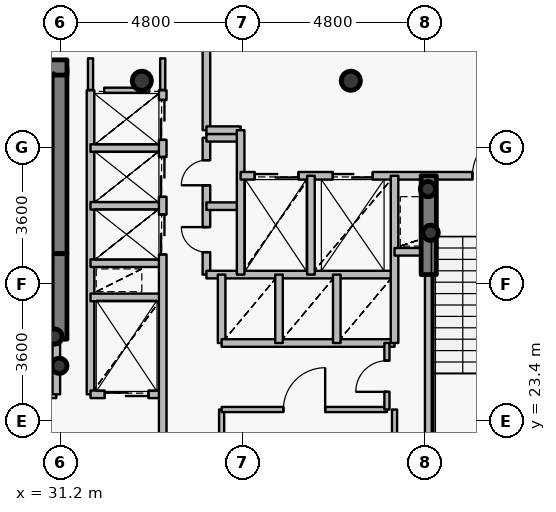
"""IFC4 building model, lengths in metres.
Left out: names, types, materials, properties, quantities, classifications, styles, units other than length and angle.
Written with IfcOpenShell. Run it as: python <this file> out.ifc"""

import sys

from ifc_helpers import new_model, si_unit, direction, frame, frame_2d, origin, origin_2d, place, context, subcontext, project, spatial, rectangle, hollow_circle, extrude, source, transform, mapped, element, fill, save


model = new_model("IFC4")
c1 = context("Model", 3, precision=1e-05, world=origin(), true_north=direction((0.0, 1.0)))
c2 = subcontext(c1, "Body", "Model", "MODEL_VIEW")
j1 = project(units=[si_unit("LENGTHUNIT", "METRE"), si_unit("PLANEANGLEUNIT", "RADIAN")], contexts=[c1])
p1 = place(None, origin())
s1 = spatial("IfcSite", under=j1, at=p1, CompositionType="ELEMENT")
p2 = place(p1, origin())
s2 = spatial("IfcBuilding", under=s1, at=p2, CompositionType="ELEMENT")
p3 = place(p2, frame((0.0, 0.0, 189.9)))
s3 = spatial("IfcBuildingStorey", under=s2, at=p3, CompositionType="ELEMENT", Elevation=189.9)
for number, where, z_axis, x_axis in (
    (1, (38.85, 32.35, 0.0), (0.0, 0.0, 1.0), (1.0, 0.0, 0.0)),
    (2, (33.35, 32.35, 0.0), (0.0, 0.0, 1.0), (1.0, 0.0, 0.0)),
):
    element("IfcColumn", number, at=place(p3, frame(where, z_axis=z_axis, x_axis=x_axis)), inside=s3, PredefinedType="COLUMN", context=c2, shape_type="SweptSolid", body=[
        extrude(hollow_circle(Radius=0.254, WallThickness=0.02, at=origin_2d()), origin(), (0.0, 0.0, 1.0), 3.75),
    ])
p4 = place(p3, frame((31.18, 27.8, 0.0), z_axis=(0.0, 0.0, 1.0), x_axis=(0.0, 1.0, 0.0)))
e3 = element("IfcWall", 3, at=p4, inside=s3, PredefinedType="SHEAR", context=c2, shape_type="SweptSolid", body=[
    extrude(rectangle(XDim=4.9, YDim=0.4, at=frame_2d((2.45, 0.0))), origin(), (0.0, 0.0, 1.0), 3.75),
])
p5 = place(p3, frame((27.28, 32.7, 0.0), z_axis=(0.0, 0.0, 1.0), x_axis=(1.0, 0.0, 0.0)))
e4 = element("IfcWall", 4, at=p5, inside=s3, PredefinedType="SHEAR", context=c2, shape_type="SweptSolid", body=[
    extrude(rectangle(XDim=4.1, YDim=0.4, at=frame_2d((2.05, 0.0))), origin(), (0.0, 0.0, 1.0), 3.75),
])
for number, where, z_axis, x_axis in (
    (5, (31.05, 25.62, 0.0), (0.0, 0.0, 1.0), (1.0, 0.0, 0.0)),
    (6, (31.18, 24.85, 0.0), (0.0, 0.0, 1.0), (1.0, 0.0, 0.0)),
    (7, (40.95, 28.35, 0.0), (0.0, 0.0, 1.0), (1.0, 0.0, 0.0)),
    (8, (40.88, 29.5, 0.0), (0.0, 0.0, 1.0), (1.0, 0.0, 0.0)),
):
    element("IfcColumn", number, at=place(p3, frame(where, z_axis=z_axis, x_axis=x_axis)), inside=s3, PredefinedType="COLUMN", context=c2, shape_type="SweptSolid", body=[
        extrude(hollow_circle(Radius=0.203, WallThickness=0.016, at=origin_2d()), origin(), (0.0, 0.0, 1.0), 3.75),
    ])
p6 = place(p3, frame((31.18, 25.55, 0.0), z_axis=(0.0, 0.0, 1.0), x_axis=(0.0, 1.0, 0.0)))
e9 = element("IfcWall", 9, at=p6, inside=s3, PredefinedType="SHEAR", context=c2, shape_type="SweptSolid", body=[
    extrude(rectangle(XDim=2.25, YDim=0.4, at=frame_2d((1.125, 0.0))), origin(), (0.0, 0.0, 1.0), 3.1),
])
p7 = place(p3, frame((40.9, 27.25, 0.0), z_axis=(0.0, 0.0, 1.0), x_axis=(0.0, 1.0, 0.0)))
e10 = element("IfcWall", 10, at=p7, inside=s3, PredefinedType="SHEAR", context=c2, shape_type="SweptSolid", body=[
    extrude(rectangle(XDim=2.6, YDim=0.4, at=frame_2d((1.3, 0.0))), origin(), (0.0, 0.0, 1.0), 3.1),
])
p8 = place(p3, frame((27.56, 24.1, 0.0), z_axis=(0.0, 0.0, 1.0), x_axis=(1.0, 0.0, 0.0)))
e11 = element("IfcWall", 11, at=p8, inside=s3, PredefinedType="PARTITIONING", context=c2, shape_type="SweptSolid", body=[
    extrude(rectangle(XDim=3.54, YDim=0.2, at=frame_2d((1.77, 0.0))), origin(), (0.0, 0.0, 1.0), 3.5),
])
p9 = place(p8, frame((1.17, 0.0, 0.0)))
e12 = element("IfcOpeningElement", 12, at=p9, cuts=e11, PredefinedType="OPENING", context=c2, shape_type="SweptSolid", body=[
    extrude(rectangle(XDim=1.2, YDim=2.15, at=origin_2d()), frame((0.6, 0.11, 1.075), z_axis=(0.0, -1.0, 0.0), x_axis=(1.0, 0.0, 0.0)), (0.0, 0.0, 1.0), 0.22),
])
p10 = place(p3, frame((31.1, 24.1, 0.0), z_axis=(0.0, 0.0, 1.0), x_axis=(0.0, 1.0, 0.0)))
e13 = element("IfcWall", 13, at=p10, inside=s3, PredefinedType="PARTITIONING", context=c2, shape_type="SweptSolid", body=[
    extrude(rectangle(XDim=1.44, YDim=0.2, at=frame_2d((0.72, 0.0))), origin(), (0.0, 0.0, 1.0), 3.5),
])
p11 = place(p3, frame((32.0, 24.1, 0.0), z_axis=(0.0, 0.0, 1.0), x_axis=(0.0, 1.0, 0.0)))
e14 = element("IfcWall", 14, at=p11, inside=s3, PredefinedType="PARTITIONING", context=c2, shape_type="SweptSolid", body=[
    extrude(rectangle(XDim=8.0, YDim=0.2, at=frame_2d((4.0, 0.0))), origin(), (0.0, 0.0, 1.0), 3.5),
])
p12 = place(p3, frame((32.0, 24.1, 0.0), z_axis=(0.0, 0.0, 1.0), x_axis=(1.0, 0.0, 0.0)))
e15 = element("IfcWall", 15, at=p12, inside=s3, PredefinedType="PARTITIONING", context=c2, shape_type="SweptSolid", body=[
    extrude(rectangle(XDim=1.9, YDim=0.2, at=frame_2d((0.95, 0.0))), origin(), (0.0, 0.0, 1.0), 3.085),
])
p13 = place(p12, frame((0.375, 0.0, 0.0)))
e16 = element("IfcOpeningElement", 16, at=p13, cuts=e15, PredefinedType="OPENING", context=c2, shape_type="SweptSolid", body=[
    extrude(rectangle(XDim=1.15, YDim=2.15, at=origin_2d()), frame((0.575, 0.11, 1.075), z_axis=(0.0, -1.0, 0.0), x_axis=(1.0, 0.0, 0.0)), (0.0, 0.0, 1.0), 0.22),
])
for number, where, z_axis, x_axis in (
    (17, (32.0, 26.65, 0.0), (0.0, 0.0, 1.0), (1.0, 0.0, 0.0)),
    (18, (32.0, 27.55, 0.0), (0.0, 0.0, 1.0), (1.0, 0.0, 0.0)),
    (19, (32.0, 29.06, 0.0), (0.0, 0.0, 1.0), (1.0, 0.0, 0.0)),
    (20, (32.0, 30.58, 0.0), (0.0, 0.0, 1.0), (1.0, 0.0, 0.0)),
):
    element("IfcWall", number, at=place(p3, frame(where, z_axis=z_axis, x_axis=x_axis)), inside=s3, PredefinedType="PARTITIONING", context=c2, shape_type="SweptSolid", body=[
        extrude(rectangle(XDim=1.9, YDim=0.2, at=frame_2d((0.95, 0.0))), origin(), (0.0, 0.0, 1.0), 3.085),
    ])
p14 = place(p3, frame((33.9, 20.8, 0.0), z_axis=(0.0, 0.0, 1.0), x_axis=(0.0, 1.0, 0.0)))
e21 = element("IfcWall", 21, at=p14, inside=s3, PredefinedType="PARTITIONING", context=c2, shape_type="SweptSolid", body=[
    extrude(rectangle(XDim=11.3, YDim=0.2, at=frame_2d((5.65, 0.0))), origin(), (0.0, 0.0, 1.0), 3.085),
])
p15 = place(p14, frame((6.98, 0.0, 0.0)))
e22 = element("IfcOpeningElement", 22, at=p15, cuts=e21, PredefinedType="OPENING", context=c2, shape_type="SweptSolid", body=[
    extrude(rectangle(XDim=1.05, YDim=2.15, at=origin_2d()), frame((0.525, 0.11, 1.075), z_axis=(0.0, -1.0, 0.0), x_axis=(1.0, 0.0, 0.0)), (0.0, 0.0, 1.0), 0.22),
])
p16 = place(p14, frame((8.495, 0.0, 0.0)))
e23 = element("IfcOpeningElement", 23, at=p16, cuts=e21, PredefinedType="OPENING", context=c2, shape_type="SweptSolid", body=[
    extrude(rectangle(XDim=1.05, YDim=2.15, at=origin_2d()), frame((0.525, 0.11, 1.075), z_axis=(0.0, -1.0, 0.0), x_axis=(1.0, 0.0, 0.0)), (0.0, 0.0, 1.0), 0.22),
])
p17 = place(p14, frame((9.995, 0.0, 0.0)))
e24 = element("IfcOpeningElement", 24, at=p17, cuts=e21, PredefinedType="OPENING", context=c2, shape_type="SweptSolid", body=[
    extrude(rectangle(XDim=1.05, YDim=2.15, at=origin_2d()), frame((0.525, 0.11, 1.075), z_axis=(0.0, -1.0, 0.0), x_axis=(1.0, 0.0, 0.0)), (0.0, 0.0, 1.0), 0.22),
])
p18 = place(p3, frame((35.05, 27.25, 0.0), z_axis=(0.0, 0.0, 1.0), x_axis=(0.0, 1.0, 0.0)))
e25 = element("IfcWall", 25, at=p18, inside=s3, PredefinedType="PARTITIONING", context=c2, shape_type="SweptSolid", body=[
    extrude(rectangle(XDim=3.6, YDim=0.2, at=frame_2d((1.8, 0.0))), origin(), (0.0, 0.0, 1.0), 3.5),
])
p19 = place(p18, frame((0.59, 0.0, 0.0)))
e26 = element("IfcOpeningElement", 26, at=p19, cuts=e25, PredefinedType="OPENING", context=c2, shape_type="SweptSolid", body=[
    extrude(rectangle(XDim=0.66, YDim=2.05, at=origin_2d()), frame((0.33, 0.11, 1.025), z_axis=(0.0, -1.0, 0.0), x_axis=(1.0, 0.0, 0.0)), (0.0, 0.0, 1.0), 0.22),
])
p20 = place(p18, frame((2.35, 0.0, 0.0)))
e27 = element("IfcOpeningElement", 27, at=p20, cuts=e25, PredefinedType="OPENING", context=c2, shape_type="SweptSolid", body=[
    extrude(rectangle(XDim=0.66, YDim=2.05, at=origin_2d()), frame((0.33, 0.11, 1.025), z_axis=(0.0, -1.0, 0.0), x_axis=(1.0, 0.0, 0.0)), (0.0, 0.0, 1.0), 0.22),
])
p21 = place(p3, frame((35.05, 27.25, 0.0), z_axis=(0.0, 0.0, 1.0), x_axis=(1.0, 0.0, 0.0)))
e28 = element("IfcWall", 28, at=p21, inside=s3, PredefinedType="PARTITIONING", context=c2, shape_type="SweptSolid", body=[
    extrude(rectangle(XDim=4.95, YDim=0.2, at=frame_2d((2.475, 0.0))), origin(), (0.0, 0.0, 1.0), 3.085),
])
for number, where, z_axis, x_axis in (
    (29, (35.05, 29.05, 0.0), (0.0, 0.0, 1.0), (1.0, 0.0, 0.0)),
    (30, (35.05, 30.85, 0.0), (0.0, 0.0, 1.0), (1.0, 0.0, 0.0)),
):
    element("IfcWall", number, at=place(p3, frame(where, z_axis=z_axis, x_axis=x_axis)), inside=s3, PredefinedType="PARTITIONING", context=c2, shape_type="SweptSolid", body=[
        extrude(rectangle(XDim=0.9, YDim=0.2, at=frame_2d((0.45, 0.0))), origin(), (0.0, 0.0, 1.0), 3.5),
    ])
p22 = place(p3, frame((35.05, 31.05, 0.0), z_axis=(0.0, 0.0, 1.0), x_axis=(0.0, 1.0, 0.0)))
e31 = element("IfcWall", 31, at=p22, inside=s3, PredefinedType="PARTITIONING", context=c2, shape_type="SweptSolid", body=[
    extrude(rectangle(XDim=2.15, YDim=0.2, at=frame_2d((1.075, 0.0))), origin(), (0.0, 0.0, 1.0), 3.085),
])
p23 = place(p3, frame((35.05, 31.05, 0.0), z_axis=(0.0, 0.0, 1.0), x_axis=(1.0, 0.0, 0.0)))
e32 = element("IfcWall", 32, at=p23, inside=s3, PredefinedType="PARTITIONING", context=c2, shape_type="SweptSolid", body=[
    extrude(rectangle(XDim=0.9, YDim=0.2, at=frame_2d((0.45, 0.0))), origin(), (0.0, 0.0, 1.0), 3.5),
])
p24 = place(p3, frame((35.45, 20.8, 0.0), z_axis=(0.0, 0.0, 1.0), x_axis=(0.0, 1.0, 0.0)))
e33 = element("IfcWall", 33, at=p24, inside=s3, PredefinedType="PARTITIONING", context=c2, shape_type="SweptSolid", body=[
    extrude(rectangle(XDim=2.9, YDim=0.135, at=frame_2d((1.45, 0.0))), origin(), (0.0, 0.0, 1.0), 3.085),
])
p25 = place(p3, frame((35.45, 23.7, 0.0), z_axis=(0.0, 0.0, 1.0), x_axis=(1.0, 0.0, 0.0)))
e34 = element("IfcWall", 34, at=p25, inside=s3, PredefinedType="PARTITIONING", context=c2, shape_type="SweptSolid", body=[
    extrude(rectangle(XDim=4.35, YDim=0.135, at=frame_2d((2.175, 0.0))), origin(), (0.0, 0.0, 1.0), 3.085),
])
p26 = place(p25, frame((1.625, 0.0, 0.0)))
e35 = element("IfcOpeningElement", 35, at=p26, cuts=e34, PredefinedType="OPENING", context=c2, shape_type="SweptSolid", body=[
    extrude(rectangle(XDim=1.1, YDim=2.15, at=origin_2d()), frame((0.55, 0.078, 1.075), z_axis=(0.0, -1.0, 0.0), x_axis=(1.0, 0.0, 0.0)), (0.0, 0.0, 1.0), 0.155),
])
p27 = place(p3, frame((35.45, 25.45, 0.0), z_axis=(0.0, 0.0, 1.0), x_axis=(0.0, 1.0, 0.0)))
e36 = element("IfcWall", 36, at=p27, inside=s3, PredefinedType="PARTITIONING", context=c2, shape_type="SweptSolid", body=[
    extrude(rectangle(XDim=1.8, YDim=0.2, at=frame_2d((0.9, 0.0))), origin(), (0.0, 0.0, 1.0), 3.5),
])
p28 = place(p3, frame((35.45, 25.45, 0.0), z_axis=(0.0, 0.0, 1.0), x_axis=(1.0, 0.0, 0.0)))
e37 = element("IfcWall", 37, at=p28, inside=s3, PredefinedType="PARTITIONING", context=c2, shape_type="SweptSolid", body=[
    extrude(rectangle(XDim=4.55, YDim=0.2, at=frame_2d((2.275, 0.0))), origin(), (0.0, 0.0, 1.0), 3.085),
])
p29 = place(p3, frame((35.95, 27.25, 0.0), z_axis=(0.0, 0.0, 1.0), x_axis=(0.0, 1.0, 0.0)))
e38 = element("IfcWall", 38, at=p29, inside=s3, PredefinedType="PARTITIONING", context=c2, shape_type="SweptSolid", body=[
    extrude(rectangle(XDim=3.8, YDim=0.2, at=frame_2d((1.9, 0.0))), origin(), (0.0, 0.0, 1.0), 3.5),
])
p30 = place(p3, frame((35.95, 29.85, 0.0), z_axis=(0.0, 0.0, 1.0), x_axis=(1.0, 0.0, 0.0)))
e39 = element("IfcWall", 39, at=p30, inside=s3, PredefinedType="PARTITIONING", context=c2, shape_type="SweptSolid", body=[
    extrude(rectangle(XDim=8.49, YDim=0.2, at=frame_2d((4.245, 0.0))), origin(), (0.0, 0.0, 1.0), 3.085),
])
p31 = place(p30, frame((6.1, 0.0, 0.0)))
e40 = element("IfcOpeningElement", 40, at=p31, cuts=e39, PredefinedType="OPENING", context=c2, shape_type="SweptSolid", body=[
    extrude(rectangle(XDim=1.2, YDim=2.15, at=origin_2d()), frame((0.6, 0.11, 1.075), z_axis=(0.0, -1.0, 0.0), x_axis=(1.0, 0.0, 0.0)), (0.0, 0.0, 1.0), 0.22),
])
p32 = place(p30, frame((0.37, 0.0, 0.0)))
e41 = element("IfcOpeningElement", 41, at=p32, cuts=e39, PredefinedType="OPENING", context=c2, shape_type="SweptSolid", body=[
    extrude(rectangle(XDim=1.15, YDim=2.15, at=origin_2d()), frame((0.575, 0.11, 1.075), z_axis=(0.0, -1.0, 0.0), x_axis=(1.0, 0.0, 0.0)), (0.0, 0.0, 1.0), 0.22),
])
p33 = place(p30, frame((2.425, 0.0, 0.0)))
e42 = element("IfcOpeningElement", 42, at=p33, cuts=e39, PredefinedType="OPENING", context=c2, shape_type="SweptSolid", body=[
    extrude(rectangle(XDim=1.05, YDim=2.15, at=origin_2d()), frame((0.525, 0.11, 1.075), z_axis=(0.0, -1.0, 0.0), x_axis=(1.0, 0.0, 0.0)), (0.0, 0.0, 1.0), 0.22),
])
p34 = place(p3, frame((36.96, 25.45, 0.0), z_axis=(0.0, 0.0, 1.0), x_axis=(0.0, 1.0, 0.0)))
e43 = element("IfcWall", 43, at=p34, inside=s3, PredefinedType="PARTITIONING", context=c2, shape_type="SweptSolid", body=[
    extrude(rectangle(XDim=1.8, YDim=0.2, at=frame_2d((0.9, 0.0))), origin(), (0.0, 0.0, 1.0), 3.5),
])
p35 = place(p3, frame((37.8, 27.25, 0.0), z_axis=(0.0, 0.0, 1.0), x_axis=(0.0, 1.0, 0.0)))
e44 = element("IfcWall", 44, at=p35, inside=s3, PredefinedType="PARTITIONING", context=c2, shape_type="SweptSolid", body=[
    extrude(rectangle(XDim=2.6, YDim=0.2, at=frame_2d((1.3, 0.0))), origin(), (0.0, 0.0, 1.0), 3.5),
])
p36 = place(p3, frame((38.48, 25.45, 0.0), z_axis=(0.0, 0.0, 1.0), x_axis=(0.0, 1.0, 0.0)))
e45 = element("IfcWall", 45, at=p36, inside=s3, PredefinedType="PARTITIONING", context=c2, shape_type="SweptSolid", body=[
    extrude(rectangle(XDim=1.8, YDim=0.2, at=frame_2d((0.9, 0.0))), origin(), (0.0, 0.0, 1.0), 3.5),
])
p37 = place(p3, frame((39.8, 23.7, 0.0), z_axis=(0.0, 0.0, 1.0), x_axis=(0.0, 1.0, 0.0)))
e46 = element("IfcWall", 46, at=p37, inside=s3, PredefinedType="PARTITIONING", context=c2, shape_type="SweptSolid", body=[
    extrude(rectangle(XDim=1.75, YDim=0.135, at=frame_2d((0.875, 0.0))), origin(), (0.0, 0.0, 1.0), 3.5),
])
p38 = place(p37, frame((0.465, 0.0, 0.0)))
e47 = element("IfcOpeningElement", 47, at=p38, cuts=e46, PredefinedType="OPENING", context=c2, shape_type="SweptSolid", body=[
    extrude(rectangle(XDim=0.82, YDim=2.1, at=origin_2d()), frame((0.41, 0.078, 1.05), z_axis=(0.0, -1.0, 0.0), x_axis=(1.0, 0.0, 0.0)), (0.0, 0.0, 1.0), 0.155),
])
p39 = place(p3, frame((40.0, 25.45, 0.0), z_axis=(0.0, 0.0, 1.0), x_axis=(0.0, 1.0, 0.0)))
e48 = element("IfcWall", 48, at=p39, inside=s3, PredefinedType="PARTITIONING", context=c2, shape_type="SweptSolid", body=[
    extrude(rectangle(XDim=4.4, YDim=0.2, at=frame_2d((2.2, 0.0))), origin(), (0.0, 0.0, 1.0), 3.5),
])
p40 = place(p3, frame((40.0, 27.85, 0.0), z_axis=(0.0, 0.0, 1.0), x_axis=(1.0, 0.0, 0.0)))
e49 = element("IfcWall", 49, at=p40, inside=s3, PredefinedType="PARTITIONING", context=c2, shape_type="SweptSolid", body=[
    extrude(rectangle(XDim=0.9, YDim=0.2, at=frame_2d((0.45, 0.0))), origin(), (0.0, 0.0, 1.0), 3.5),
])
p41 = place(p3, frame((40.9, 21.33, 0.0), z_axis=(0.0, 0.0, 1.0), x_axis=(0.0, 1.0, 0.0)))
e50 = element("IfcWall", 50, at=p41, inside=s3, PredefinedType="PARTITIONING", context=c2, shape_type="SweptSolid", body=[
    extrude(rectangle(XDim=5.91, YDim=0.2, at=frame_2d((2.955, 0.0))), origin(), (0.0, 0.0, 1.0), 3.035),
])
p42 = place(p3, frame((32.36, 32.1, 0.0), z_axis=(0.0, 0.0, 1.0), x_axis=(1.0, 0.0, 0.0)))
e51 = element("IfcWall", 51, at=p42, inside=s3, PredefinedType="PARTITIONING", context=c2, shape_type="SweptSolid", body=[
    extrude(rectangle(XDim=1.18, YDim=0.135, at=frame_2d((0.59, 0.0))), origin(), (0.0, 0.0, 1.0), 3.085),
])
p43 = place(p3, frame((40.0, 23.7, 0.0), z_axis=(0.0, 0.0, 1.0), x_axis=(0.0, -1.0, 0.0)))
e52 = element("IfcWall", 52, at=p43, inside=s3, PredefinedType="PARTITIONING", context=c2, shape_type="SweptSolid", body=[
    extrude(rectangle(XDim=2.64, YDim=0.135, at=frame_2d((1.32, 0.0))), origin(), (0.0, 0.0, 1.0), 3.035),
])
p44 = place(p3, frame((32.0, 32.94, 0.0), z_axis=(0.0, 0.0, 1.0), x_axis=(0.0, -1.0, 0.0)))
e53 = element("IfcWall", 53, at=p44, inside=s3, PredefinedType="PARTITIONING", context=c2, shape_type="SweptSolid", body=[
    extrude(rectangle(XDim=0.83, YDim=0.135, at=frame_2d((0.415, 0.0))), origin(), (0.0, 0.0, 1.0), 3.035),
])
p45 = place(p3, frame((33.9, 32.11, 0.0), z_axis=(0.0, 0.0, 1.0), x_axis=(0.0, 1.0, 0.0)))
e54 = element("IfcWall", 54, at=p45, inside=s3, PredefinedType="PARTITIONING", context=c2, shape_type="SweptSolid", body=[
    extrude(rectangle(XDim=0.83, YDim=0.135, at=frame_2d((0.415, 0.0))), origin(), (0.0, 0.0, 1.0), 3.085),
])
m1 = source(origin(), c2, "Body", "SweptSolid", [
    extrude(rectangle(XDim=1.2, YDim=2.15, at=origin_2d()), frame((0.6, 0.025, 1.075), z_axis=(0.0, -1.0, 0.0), x_axis=(1.0, 0.0, 0.0)), (0.0, 0.0, 1.0), 0.05),
])
p46 = place(p31, origin())
e55 = element("IfcDoor", 55, at=p46, inside=s3, OperationType="SINGLE_SWING_RIGHT", PredefinedType="DOOR", context=c2, shape_type="MappedRepresentation", body=[
    mapped(m1, transform((0.0, 0.0, 0.0), x_axis=(1.0, 0.0, 0.0), y_axis=(0.0, 1.0, 0.0), z_axis=(0.0, 0.0, 1.0), scale=1.0)),
])
fill(e40, e55)
m2 = source(origin(), c2, "Body", "SweptSolid", [
    extrude(rectangle(XDim=1.15, YDim=2.15, at=origin_2d()), frame((0.575, 0.025, 1.075), z_axis=(0.0, -1.0, 0.0), x_axis=(1.0, 0.0, 0.0)), (0.0, 0.0, 1.0), 0.05),
])
p47 = place(p32, origin())
e56 = element("IfcDoor", 56, at=p47, inside=s3, OperationType="DOUBLE_DOOR_SLIDING", PredefinedType="USERDEFINED", context=c2, shape_type="MappedRepresentation", body=[
    mapped(m2, transform((0.0, 0.0, 0.0), x_axis=(1.0, 0.0, 0.0), y_axis=(0.0, 1.0, 0.0), z_axis=(0.0, 0.0, 1.0), scale=1.0)),
])
fill(e41, e56)
p48 = place(p13, origin())
e57 = element("IfcDoor", 57, at=p48, inside=s3, OperationType="DOUBLE_DOOR_SLIDING", PredefinedType="USERDEFINED", context=c2, shape_type="MappedRepresentation", body=[
    mapped(m2, transform((0.0, 0.0, 0.0), x_axis=(1.0, 0.0, 0.0), y_axis=(0.0, 1.0, 0.0), z_axis=(0.0, 0.0, 1.0), scale=1.0)),
])
fill(e16, e57)
m3 = source(origin(), c2, "Body", "SweptSolid", [
    extrude(rectangle(XDim=1.05, YDim=2.15, at=origin_2d()), frame((0.525, 0.025, 1.075), z_axis=(0.0, -1.0, 0.0), x_axis=(1.0, 0.0, 0.0)), (0.0, 0.0, 1.0), 0.05),
])
p49 = place(p33, origin())
e58 = element("IfcDoor", 58, at=p49, inside=s3, OperationType="DOUBLE_DOOR_SLIDING", PredefinedType="USERDEFINED", context=c2, shape_type="MappedRepresentation", body=[
    mapped(m3, transform((0.0, 0.0, 0.0), x_axis=(1.0, 0.0, 0.0), y_axis=(0.0, 1.0, 0.0), z_axis=(0.0, 0.0, 1.0), scale=1.0)),
])
fill(e42, e58)
p50 = place(p15, origin())
e59 = element("IfcDoor", 59, at=p50, inside=s3, OperationType="DOUBLE_DOOR_SLIDING", PredefinedType="USERDEFINED", context=c2, shape_type="MappedRepresentation", body=[
    mapped(m3, transform((0.0, 0.0, 0.0), x_axis=(1.0, 0.0, 0.0), y_axis=(0.0, 1.0, 0.0), z_axis=(0.0, 0.0, 1.0), scale=1.0)),
])
fill(e22, e59)
p51 = place(p16, origin())
e60 = element("IfcDoor", 60, at=p51, inside=s3, OperationType="DOUBLE_DOOR_SLIDING", PredefinedType="USERDEFINED", context=c2, shape_type="MappedRepresentation", body=[
    mapped(m3, transform((0.0, 0.0, 0.0), x_axis=(1.0, 0.0, 0.0), y_axis=(0.0, 1.0, 0.0), z_axis=(0.0, 0.0, 1.0), scale=1.0)),
])
fill(e23, e60)
p52 = place(p17, origin())
e61 = element("IfcDoor", 61, at=p52, inside=s3, OperationType="DOUBLE_DOOR_SLIDING", PredefinedType="USERDEFINED", context=c2, shape_type="MappedRepresentation", body=[
    mapped(m3, transform((0.0, 0.0, 0.0), x_axis=(1.0, 0.0, 0.0), y_axis=(0.0, 1.0, 0.0), z_axis=(0.0, 0.0, 1.0), scale=1.0)),
])
fill(e24, e61)
m4 = source(origin(), c2, "Body", "SweptSolid", [
    extrude(rectangle(XDim=0.66, YDim=2.05, at=origin_2d()), frame((0.33, 0.025, 1.025), z_axis=(0.0, -1.0, 0.0), x_axis=(1.0, 0.0, 0.0)), (0.0, 0.0, 1.0), 0.05),
])
p53 = place(p19, origin())
e62 = element("IfcDoor", 62, at=p53, inside=s3, OperationType="SINGLE_SWING_RIGHT", PredefinedType="USERDEFINED", context=c2, shape_type="MappedRepresentation", body=[
    mapped(m4, transform((0.0, 0.0, 0.0), x_axis=(1.0, 0.0, 0.0), y_axis=(0.0, 1.0, 0.0), z_axis=(0.0, 0.0, 1.0), scale=1.0)),
])
fill(e26, e62)
p54 = place(p20, origin())
e63 = element("IfcDoor", 63, at=p54, inside=s3, OperationType="SINGLE_SWING_LEFT", PredefinedType="USERDEFINED", context=c2, shape_type="MappedRepresentation", body=[
    mapped(m4, transform((0.0, 0.0, 0.0), x_axis=(1.0, 0.0, 0.0), y_axis=(0.0, 1.0, 0.0), z_axis=(0.0, 0.0, 1.0), scale=1.0)),
])
fill(e27, e63)
m5 = source(origin(), c2, "Body", "SweptSolid", [
    extrude(rectangle(XDim=1.1, YDim=2.15, at=origin_2d()), frame((0.55, 0.025, 1.075), z_axis=(0.0, -1.0, 0.0), x_axis=(1.0, 0.0, 0.0)), (0.0, 0.0, 1.0), 0.05),
])
p55 = place(p26, origin())
e64 = element("IfcDoor", 64, at=p55, inside=s3, OperationType="SINGLE_SWING_RIGHT", PredefinedType="DOOR", context=c2, shape_type="MappedRepresentation", body=[
    mapped(m5, transform((0.0, 0.0, 0.0), x_axis=(1.0, 0.0, 0.0), y_axis=(0.0, 1.0, 0.0), z_axis=(0.0, 0.0, 1.0), scale=1.0)),
])
fill(e35, e64)
m6 = source(origin(), c2, "Body", "SweptSolid", [
    extrude(rectangle(XDim=0.82, YDim=2.1, at=origin_2d()), frame((0.41, 0.025, 1.05), z_axis=(0.0, -1.0, 0.0), x_axis=(1.0, 0.0, 0.0)), (0.0, 0.0, 1.0), 0.05),
])
p56 = place(p38, origin())
e65 = element("IfcDoor", 65, at=p56, inside=s3, OperationType="SINGLE_SWING_LEFT", PredefinedType="DOOR", context=c2, shape_type="MappedRepresentation", body=[
    mapped(m6, transform((0.0, 0.0, 0.0), x_axis=(1.0, 0.0, 0.0), y_axis=(0.0, 1.0, 0.0), z_axis=(0.0, 0.0, 1.0), scale=1.0)),
])
fill(e47, e65)
save(model, sys.argv[1])
